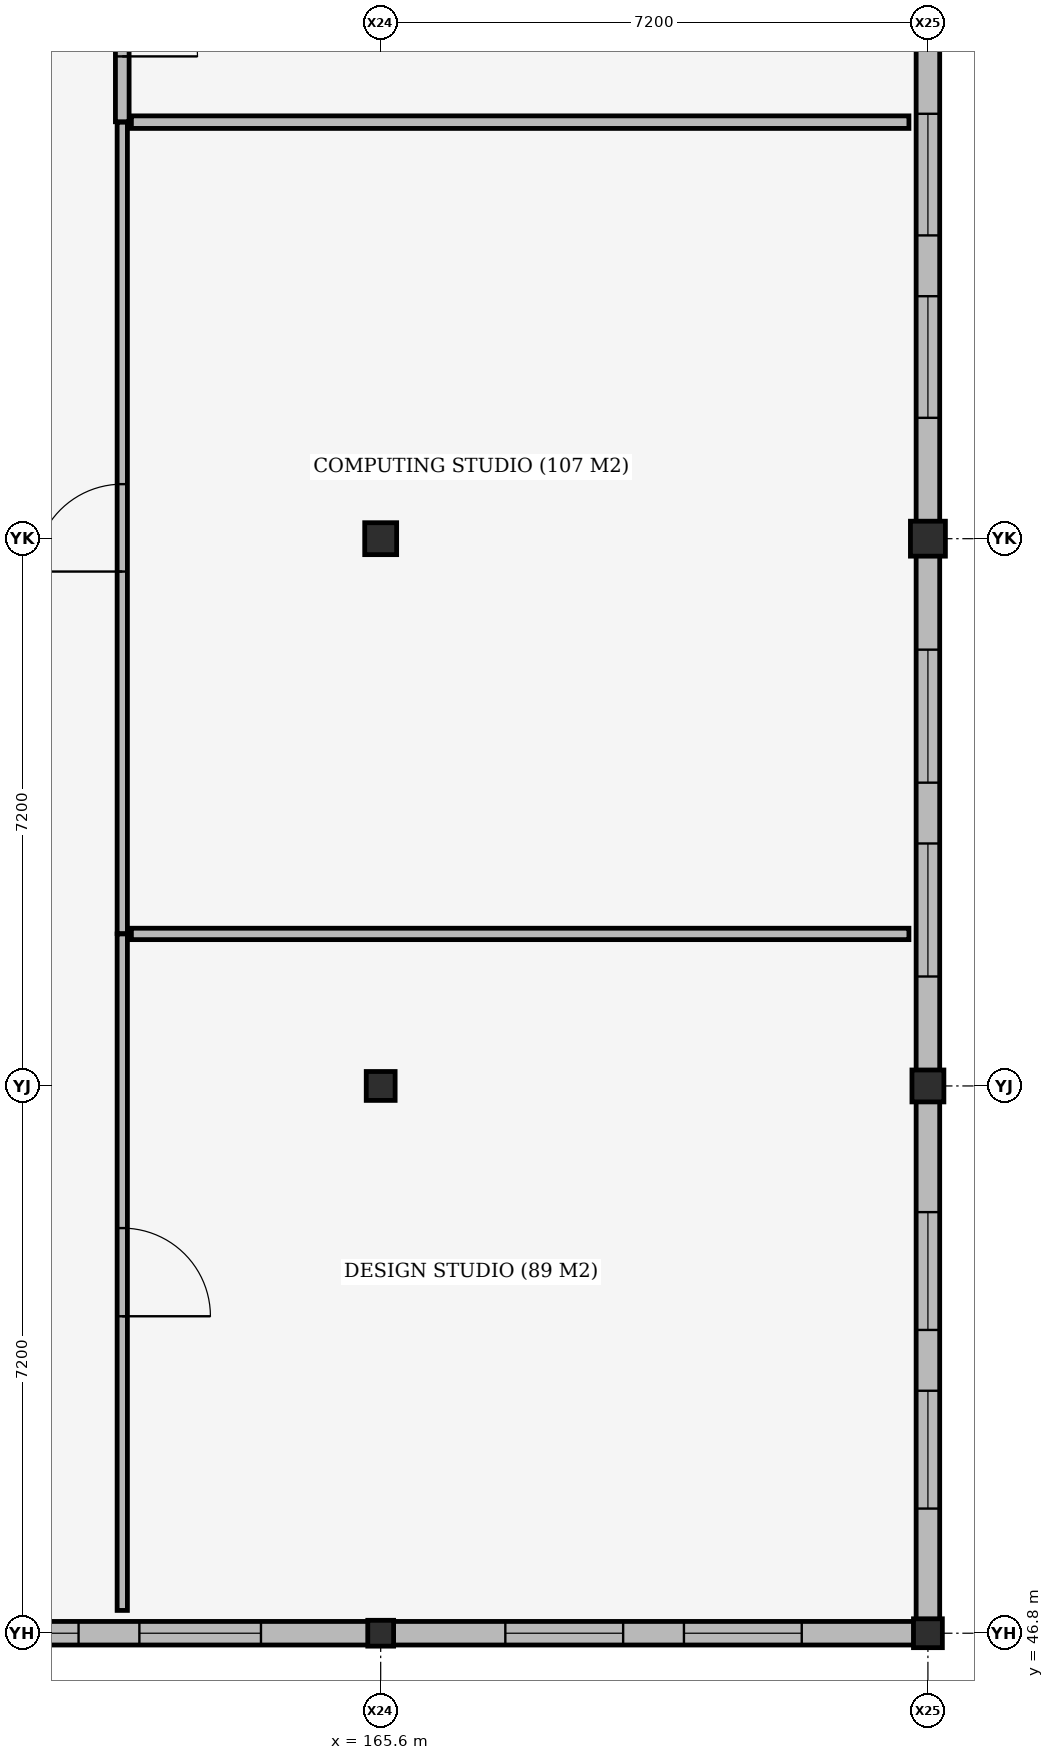
"""IFC4 building model, lengths in metres.
Left out: names, types, materials, properties, quantities, classifications, styles, units other than length and angle.
Written with IfcOpenShell. Run it as: python <this file> out.ifc"""

import sys

from ifc_helpers import new_model, si_unit, direction, frame, frame_2d, origin, origin_2d, place, context, subcontext, project, spatial, rectangle, extrude, element, fill, save


model = new_model("IFC4")
c1 = context("Model", 3, precision=1e-05, world=origin(), true_north=direction((0.0, 1.0)))
c2 = subcontext(c1, "Body", "Model", "MODEL_VIEW")
j1 = project(units=[si_unit("LENGTHUNIT", "METRE"), si_unit("PLANEANGLEUNIT", "RADIAN")], contexts=[c1])
p1 = place(None, origin())
s1 = spatial("IfcSite", under=j1, at=p1, CompositionType="ELEMENT")
p2 = place(p1, origin())
s2 = spatial("IfcBuilding", under=s1, at=p2, CompositionType="ELEMENT")
p3 = place(p2, frame((0.0, 0.0, 13.8)))
s3 = spatial("IfcBuildingStorey", under=s2, at=p3, CompositionType="ELEMENT", Elevation=13.8)
p4 = place(p3, frame((165.6, 46.8, 0.0), z_axis=(0.0, 0.0, 1.0), x_axis=(1.0, 0.0, 0.0)))
e1 = element("IfcColumn", 1, at=p4, inside=s3, PredefinedType="COLUMN", context=c2, shape_type="SweptSolid", body=[
    extrude(rectangle(XDim=0.34, YDim=0.34, at=origin_2d()), origin(), (0.0, 0.0, 1.0), 3.96),
])
p5 = place(p3, frame((165.6, 54.0, 0.0), z_axis=(0.0, 0.0, 1.0), x_axis=(1.0, 0.0, 0.0)))
e2 = element("IfcColumn", 2, at=p5, inside=s3, PredefinedType="COLUMN", context=c2, shape_type="SweptSolid", body=[
    extrude(rectangle(XDim=0.38, YDim=0.38, at=origin_2d()), origin(), (0.0, 0.0, 1.0), 3.96),
])
p6 = place(p3, frame((165.6, 61.2, 0.0), z_axis=(0.0, 0.0, 1.0), x_axis=(1.0, 0.0, 0.0)))
e3 = element("IfcColumn", 3, at=p6, inside=s3, PredefinedType="COLUMN", context=c2, shape_type="SweptSolid", body=[
    extrude(rectangle(XDim=0.42, YDim=0.42, at=origin_2d()), origin(), (0.0, 0.0, 1.0), 3.96),
])
p7 = place(p3, frame((172.8, 46.8, 0.0), z_axis=(0.0, 0.0, 1.0), x_axis=(1.0, 0.0, 0.0)))
e4 = element("IfcColumn", 4, at=p7, inside=s3, PredefinedType="COLUMN", context=c2, shape_type="SweptSolid", body=[
    extrude(rectangle(XDim=0.38, YDim=0.38, at=origin_2d()), origin(), (0.0, 0.0, 1.0), 3.96),
])
p8 = place(p3, frame((172.8, 54.0, 0.0), z_axis=(0.0, 0.0, 1.0), x_axis=(1.0, 0.0, 0.0)))
e5 = element("IfcColumn", 5, at=p8, inside=s3, PredefinedType="COLUMN", context=c2, shape_type="SweptSolid", body=[
    extrude(rectangle(XDim=0.42, YDim=0.42, at=origin_2d()), origin(), (0.0, 0.0, 1.0), 3.96),
])
p9 = place(p3, frame((172.8, 61.2, 0.0), z_axis=(0.0, 0.0, 1.0), x_axis=(1.0, 0.0, 0.0)))
e6 = element("IfcColumn", 6, at=p9, inside=s3, PredefinedType="COLUMN", context=c2, shape_type="SweptSolid", body=[
    extrude(rectangle(XDim=0.46, YDim=0.46, at=origin_2d()), origin(), (0.0, 0.0, 1.0), 3.96),
])
p10 = place(p3, frame((165.438, 46.8, 0.0), z_axis=(0.0, 0.0, 1.0), x_axis=(-1.0, 0.0, 0.0)))
e7 = element("IfcWall", 7, at=p10, inside=s3, PredefinedType="STANDARD", context=c2, shape_type="SweptSolid", body=[
    extrude(rectangle(XDim=6.826, YDim=0.31, at=frame_2d((3.413, 0.0))), origin(), (0.0, 0.0, 1.0), 3.935),
])
p11 = place(p10, frame((1.413, 0.0, 0.8)))
e8 = element("IfcOpeningElement", 8, at=p11, cuts=e7, PredefinedType="OPENING", context=c2, shape_type="SweptSolid", body=[
    extrude(rectangle(XDim=1.6, YDim=2.6, at=frame_2d((0.8, 1.3))), frame((0.0, 0.165, 0.0), z_axis=(0.0, -1.0, 0.0), x_axis=(1.0, 0.0, 0.0)), (0.0, 0.0, 1.0), 0.33),
])
p12 = place(p10, frame((3.813, 0.0, 0.8)))
e9 = element("IfcOpeningElement", 9, at=p12, cuts=e7, PredefinedType="OPENING", context=c2, shape_type="SweptSolid", body=[
    extrude(rectangle(XDim=1.6, YDim=2.6, at=frame_2d((0.8, 1.3))), frame((0.0, 0.165, 0.0), z_axis=(0.0, -1.0, 0.0), x_axis=(1.0, 0.0, 0.0)), (0.0, 0.0, 1.0), 0.33),
])
p13 = place(p3, frame((172.618, 46.8, 0.0), z_axis=(0.0, 0.0, 1.0), x_axis=(-1.0, 0.0, 0.0)))
e10 = element("IfcWall", 10, at=p13, inside=s3, PredefinedType="STANDARD", context=c2, shape_type="SweptSolid", body=[
    extrude(rectangle(XDim=6.856, YDim=0.31, at=frame_2d((3.428, 0.0))), origin(), (0.0, 0.0, 1.0), 3.935),
])
p14 = place(p13, frame((1.478, 0.0, 0.85)))
e11 = element("IfcOpeningElement", 11, at=p14, cuts=e10, PredefinedType="OPENING", context=c2, shape_type="SweptSolid", body=[
    extrude(rectangle(XDim=1.55, YDim=2.45, at=frame_2d((0.775, 1.225))), frame((0.0, 0.165, 0.0), z_axis=(0.0, -1.0, 0.0), x_axis=(1.0, 0.0, 0.0)), (0.0, 0.0, 1.0), 0.33),
])
p15 = place(p13, frame((3.828, 0.0, 0.85)))
e12 = element("IfcOpeningElement", 12, at=p15, cuts=e10, PredefinedType="OPENING", context=c2, shape_type="SweptSolid", body=[
    extrude(rectangle(XDim=1.55, YDim=2.45, at=frame_2d((0.775, 1.225))), frame((0.0, 0.165, 0.0), z_axis=(0.0, -1.0, 0.0), x_axis=(1.0, 0.0, 0.0)), (0.0, 0.0, 1.0), 0.33),
])
p16 = place(p3, frame((172.8, 53.798, 0.0), z_axis=(0.0, 0.0, 1.0), x_axis=(0.0, -1.0, 0.0)))
e13 = element("IfcWall", 13, at=p16, inside=s3, PredefinedType="STANDARD", context=c2, shape_type="SweptSolid", body=[
    extrude(rectangle(XDim=6.816, YDim=0.31, at=frame_2d((3.408, 0.0))), origin(), (0.0, 0.0, 1.0), 3.935),
])
p17 = place(p16, frame((1.458, 0.0, 0.85)))
e14 = element("IfcOpeningElement", 14, at=p17, cuts=e13, PredefinedType="OPENING", context=c2, shape_type="SweptSolid", body=[
    extrude(rectangle(XDim=1.55, YDim=2.45, at=frame_2d((0.775, 1.225))), frame((0.0, 0.165, 0.0), z_axis=(0.0, -1.0, 0.0), x_axis=(1.0, 0.0, 0.0)), (0.0, 0.0, 1.0), 0.33),
])
p18 = place(p16, frame((3.808, 0.0, 0.85)))
e15 = element("IfcOpeningElement", 15, at=p18, cuts=e13, PredefinedType="OPENING", context=c2, shape_type="SweptSolid", body=[
    extrude(rectangle(XDim=1.55, YDim=2.45, at=frame_2d((0.775, 1.225))), frame((0.0, 0.165, 0.0), z_axis=(0.0, -1.0, 0.0), x_axis=(1.0, 0.0, 0.0)), (0.0, 0.0, 1.0), 0.33),
])
p19 = place(p3, frame((172.8, 60.978, 0.0), z_axis=(0.0, 0.0, 1.0), x_axis=(0.0, -1.0, 0.0)))
e16 = element("IfcWall", 16, at=p19, inside=s3, PredefinedType="STANDARD", context=c2, shape_type="SweptSolid", body=[
    extrude(rectangle(XDim=6.776, YDim=0.31, at=frame_2d((3.388, 0.0))), origin(), (0.0, 0.0, 1.0), 3.935),
])
p20 = place(p19, frame((1.238, 0.0, 0.85)))
e17 = element("IfcOpeningElement", 17, at=p20, cuts=e16, PredefinedType="OPENING", context=c2, shape_type="SweptSolid", body=[
    extrude(rectangle(XDim=1.75, YDim=2.45, at=frame_2d((0.875, 1.225))), frame((0.0, 0.165, 0.0), z_axis=(0.0, -1.0, 0.0), x_axis=(1.0, 0.0, 0.0)), (0.0, 0.0, 1.0), 0.33),
])
p21 = place(p19, frame((3.788, 0.0, 0.85)))
e18 = element("IfcOpeningElement", 18, at=p21, cuts=e16, PredefinedType="OPENING", context=c2, shape_type="SweptSolid", body=[
    extrude(rectangle(XDim=1.75, YDim=2.45, at=frame_2d((0.875, 1.225))), frame((0.0, 0.165, 0.0), z_axis=(0.0, -1.0, 0.0), x_axis=(1.0, 0.0, 0.0)), (0.0, 0.0, 1.0), 0.33),
])
p22 = place(p3, frame((172.8, 68.158, 0.0), z_axis=(0.0, 0.0, 1.0), x_axis=(0.0, -1.0, 0.0)))
e19 = element("IfcWall", 19, at=p22, inside=s3, PredefinedType="STANDARD", context=c2, shape_type="SweptSolid", body=[
    extrude(rectangle(XDim=6.736, YDim=0.31, at=frame_2d((3.368, 0.0))), origin(), (0.0, 0.0, 1.0), 3.935),
])
p23 = place(p22, frame((1.368, 0.0, 0.8)))
e20 = element("IfcOpeningElement", 20, at=p23, cuts=e19, PredefinedType="OPENING", context=c2, shape_type="SweptSolid", body=[
    extrude(rectangle(XDim=1.6, YDim=2.6, at=frame_2d((0.8, 1.3))), frame((0.0, 0.165, 0.0), z_axis=(0.0, -1.0, 0.0), x_axis=(1.0, 0.0, 0.0)), (0.0, 0.0, 1.0), 0.33),
])
p24 = place(p22, frame((3.768, 0.0, 0.8)))
e21 = element("IfcOpeningElement", 21, at=p24, cuts=e19, PredefinedType="OPENING", context=c2, shape_type="SweptSolid", body=[
    extrude(rectangle(XDim=1.6, YDim=2.6, at=frame_2d((0.8, 1.3))), frame((0.0, 0.165, 0.0), z_axis=(0.0, -1.0, 0.0), x_axis=(1.0, 0.0, 0.0)), (0.0, 0.0, 1.0), 0.33),
])
p25 = place(p3, frame((162.2, 47.1, 0.0), z_axis=(0.0, 0.0, 1.0), x_axis=(0.0, 1.0, 0.0)))
e22 = element("IfcWall", 22, at=p25, inside=s3, PredefinedType="PARTITIONING", context=c2, shape_type="SweptSolid", body=[
    extrude(rectangle(XDim=8.9, YDim=0.135, at=frame_2d((4.45, 0.0))), origin(), (0.0, 0.0, 1.0), 3.935),
])
p26 = place(p25, frame((3.87, 0.0, 0.0)))
e23 = element("IfcOpeningElement", 23, at=p26, cuts=e22, PredefinedType="OPENING", context=c2, shape_type="SweptSolid", body=[
    extrude(rectangle(XDim=1.16, YDim=2.2, at=frame_2d((0.58, 1.1))), frame((0.0, 0.077, 0.0), z_axis=(0.0, -1.0, 0.0), x_axis=(1.0, 0.0, 0.0)), (0.0, 0.0, 1.0), 0.155),
])
p27 = place(p3, frame((162.32, 56.0, 0.0), z_axis=(0.0, 0.0, 1.0), x_axis=(1.0, 0.0, 0.0)))
e24 = element("IfcWall", 24, at=p27, inside=s3, PredefinedType="PARTITIONING", context=c2, shape_type="SweptSolid", body=[
    extrude(rectangle(XDim=10.23, YDim=0.15, at=frame_2d((5.115, 0.0))), origin(), (0.0, 0.0, 1.0), 3.935),
])
p28 = place(p3, frame((162.2, 56.005, 0.0), z_axis=(0.0, 0.0, 1.0), x_axis=(0.0, 1.0, 0.0)))
e25 = element("IfcWall", 25, at=p28, inside=s3, PredefinedType="PARTITIONING", context=c2, shape_type="SweptSolid", body=[
    extrude(rectangle(XDim=10.675, YDim=0.135, at=frame_2d((5.337, 0.0))), origin(), (0.0, 0.0, 1.0), 3.935),
])
p29 = place(p28, frame((4.762, 0.0, 0.0)))
e26 = element("IfcOpeningElement", 26, at=p29, cuts=e25, PredefinedType="OPENING", context=c2, shape_type="SweptSolid", body=[
    extrude(rectangle(XDim=1.15, YDim=2.2, at=frame_2d((0.575, 1.1))), frame((0.0, 0.077, 0.0), z_axis=(0.0, -1.0, 0.0), x_axis=(1.0, 0.0, 0.0)), (0.0, 0.0, 1.0), 0.155),
])
p30 = place(p3, frame((162.32, 66.68, 0.0), z_axis=(0.0, 0.0, 1.0), x_axis=(1.0, 0.0, 0.0)))
e27 = element("IfcWall", 27, at=p30, inside=s3, PredefinedType="PARTITIONING", context=c2, shape_type="SweptSolid", body=[
    extrude(rectangle(XDim=10.23, YDim=0.165, at=frame_2d((5.115, 0.0))), origin(), (0.0, 0.0, 1.0), 3.935),
])
p31 = place(p3, frame((162.2, 66.685, 0.0), z_axis=(0.0, 0.0, 1.0), x_axis=(0.0, 1.0, 0.0)))
e28 = element("IfcWall", 28, at=p31, inside=s3, PredefinedType="PARTITIONING", context=c2, shape_type="SweptSolid", body=[
    extrude(rectangle(XDim=2.71, YDim=0.18, at=frame_2d((1.355, 0.0))), origin(), (0.0, 0.0, 1.0), 3.195),
])
p32 = place(p31, frame((0.86, 0.0, 0.0)))
e29 = element("IfcOpeningElement", 29, at=p32, cuts=e28, PredefinedType="OPENING", context=c2, shape_type="SweptSolid", body=[
    extrude(rectangle(XDim=0.99, YDim=2.18, at=frame_2d((0.495, 1.09))), frame((0.0, 0.1, 0.0), z_axis=(0.0, -1.0, 0.0), x_axis=(1.0, 0.0, 0.0)), (0.0, 0.0, 1.0), 0.2),
])
p33 = place(p11, origin())
e30 = element("IfcWindow", 30, at=p33, inside=s3, PartitioningType="DOUBLE_PANEL_VERTICAL", PredefinedType="WINDOW", context=c2, shape_type="SweptSolid", body=[
    extrude(rectangle(XDim=1.6, YDim=2.6, at=frame_2d((0.8, 1.3))), frame((0.0, 0.03, 0.0), z_axis=(0.0, -1.0, 0.0), x_axis=(1.0, 0.0, 0.0)), (0.0, 0.0, 1.0), 0.06),
])
fill(e8, e30)
p34 = place(p12, origin())
e31 = element("IfcWindow", 31, at=p34, inside=s3, PartitioningType="DOUBLE_PANEL_VERTICAL", PredefinedType="WINDOW", context=c2, shape_type="SweptSolid", body=[
    extrude(rectangle(XDim=1.6, YDim=2.6, at=frame_2d((0.8, 1.3))), frame((0.0, 0.03, 0.0), z_axis=(0.0, -1.0, 0.0), x_axis=(1.0, 0.0, 0.0)), (0.0, 0.0, 1.0), 0.06),
])
fill(e9, e31)
p35 = place(p14, origin())
e32 = element("IfcWindow", 32, at=p35, inside=s3, PartitioningType="DOUBLE_PANEL_VERTICAL", PredefinedType="WINDOW", context=c2, shape_type="SweptSolid", body=[
    extrude(rectangle(XDim=1.55, YDim=2.45, at=frame_2d((0.775, 1.225))), frame((0.0, 0.03, 0.0), z_axis=(0.0, -1.0, 0.0), x_axis=(1.0, 0.0, 0.0)), (0.0, 0.0, 1.0), 0.06),
])
fill(e11, e32)
p36 = place(p15, origin())
e33 = element("IfcWindow", 33, at=p36, inside=s3, PartitioningType="DOUBLE_PANEL_VERTICAL", PredefinedType="WINDOW", context=c2, shape_type="SweptSolid", body=[
    extrude(rectangle(XDim=1.55, YDim=2.45, at=frame_2d((0.775, 1.225))), frame((0.0, 0.03, 0.0), z_axis=(0.0, -1.0, 0.0), x_axis=(1.0, 0.0, 0.0)), (0.0, 0.0, 1.0), 0.06),
])
fill(e12, e33)
p37 = place(p17, origin())
e34 = element("IfcWindow", 34, at=p37, inside=s3, PartitioningType="DOUBLE_PANEL_VERTICAL", PredefinedType="WINDOW", context=c2, shape_type="SweptSolid", body=[
    extrude(rectangle(XDim=1.55, YDim=2.45, at=frame_2d((0.775, 1.225))), frame((0.0, 0.03, 0.0), z_axis=(0.0, -1.0, 0.0), x_axis=(1.0, 0.0, 0.0)), (0.0, 0.0, 1.0), 0.06),
])
fill(e14, e34)
p38 = place(p18, origin())
e35 = element("IfcWindow", 35, at=p38, inside=s3, PartitioningType="DOUBLE_PANEL_VERTICAL", PredefinedType="WINDOW", context=c2, shape_type="SweptSolid", body=[
    extrude(rectangle(XDim=1.55, YDim=2.45, at=frame_2d((0.775, 1.225))), frame((0.0, 0.03, 0.0), z_axis=(0.0, -1.0, 0.0), x_axis=(1.0, 0.0, 0.0)), (0.0, 0.0, 1.0), 0.06),
])
fill(e15, e35)
p39 = place(p20, origin())
e36 = element("IfcWindow", 36, at=p39, inside=s3, PartitioningType="DOUBLE_PANEL_VERTICAL", PredefinedType="WINDOW", context=c2, shape_type="SweptSolid", body=[
    extrude(rectangle(XDim=1.75, YDim=2.45, at=frame_2d((0.875, 1.225))), frame((0.0, 0.03, 0.0), z_axis=(0.0, -1.0, 0.0), x_axis=(1.0, 0.0, 0.0)), (0.0, 0.0, 1.0), 0.06),
])
fill(e17, e36)
p40 = place(p21, origin())
e37 = element("IfcWindow", 37, at=p40, inside=s3, PartitioningType="DOUBLE_PANEL_VERTICAL", PredefinedType="WINDOW", context=c2, shape_type="SweptSolid", body=[
    extrude(rectangle(XDim=1.75, YDim=2.45, at=frame_2d((0.875, 1.225))), frame((0.0, 0.03, 0.0), z_axis=(0.0, -1.0, 0.0), x_axis=(1.0, 0.0, 0.0)), (0.0, 0.0, 1.0), 0.06),
])
fill(e18, e37)
p41 = place(p23, origin())
e38 = element("IfcWindow", 38, at=p41, inside=s3, PartitioningType="DOUBLE_PANEL_VERTICAL", PredefinedType="WINDOW", context=c2, shape_type="SweptSolid", body=[
    extrude(rectangle(XDim=1.6, YDim=2.6, at=frame_2d((0.8, 1.3))), frame((0.0, 0.03, 0.0), z_axis=(0.0, -1.0, 0.0), x_axis=(1.0, 0.0, 0.0)), (0.0, 0.0, 1.0), 0.06),
])
fill(e20, e38)
p42 = place(p24, origin())
e39 = element("IfcWindow", 39, at=p42, inside=s3, PartitioningType="DOUBLE_PANEL_VERTICAL", PredefinedType="WINDOW", context=c2, shape_type="SweptSolid", body=[
    extrude(rectangle(XDim=1.6, YDim=2.6, at=frame_2d((0.8, 1.3))), frame((0.0, 0.03, 0.0), z_axis=(0.0, -1.0, 0.0), x_axis=(1.0, 0.0, 0.0)), (0.0, 0.0, 1.0), 0.06),
])
fill(e21, e39)
p43 = place(p26, origin())
e40 = element("IfcDoor", 40, at=p43, inside=s3, OperationType="SINGLE_SWING_RIGHT", PredefinedType="DOOR", context=c2, shape_type="SweptSolid", body=[
    extrude(rectangle(XDim=1.16, YDim=2.2, at=frame_2d((0.58, 1.1))), frame((0.0, 0.025, 0.0), z_axis=(0.0, -1.0, 0.0), x_axis=(1.0, 0.0, 0.0)), (0.0, 0.0, 1.0), 0.05),
])
fill(e23, e40)
p44 = place(p29, origin())
e41 = element("IfcDoor", 41, at=p44, inside=s3, OperationType="SINGLE_SWING_LEFT", PredefinedType="DOOR", context=c2, shape_type="SweptSolid", body=[
    extrude(rectangle(XDim=1.15, YDim=2.2, at=frame_2d((0.575, 1.1))), frame((0.0, 0.025, 0.0), z_axis=(0.0, -1.0, 0.0), x_axis=(1.0, 0.0, 0.0)), (0.0, 0.0, 1.0), 0.05),
])
fill(e26, e41)
p45 = place(p32, origin())
e42 = element("IfcDoor", 42, at=p45, inside=s3, OperationType="SINGLE_SWING_RIGHT", PredefinedType="DOOR", context=c2, shape_type="SweptSolid", body=[
    extrude(rectangle(XDim=0.99, YDim=2.18, at=frame_2d((0.495, 1.09))), frame((0.0, 0.025, 0.0), z_axis=(0.0, -1.0, 0.0), x_axis=(1.0, 0.0, 0.0)), (0.0, 0.0, 1.0), 0.05),
])
fill(e29, e42)
save(model, sys.argv[1])
